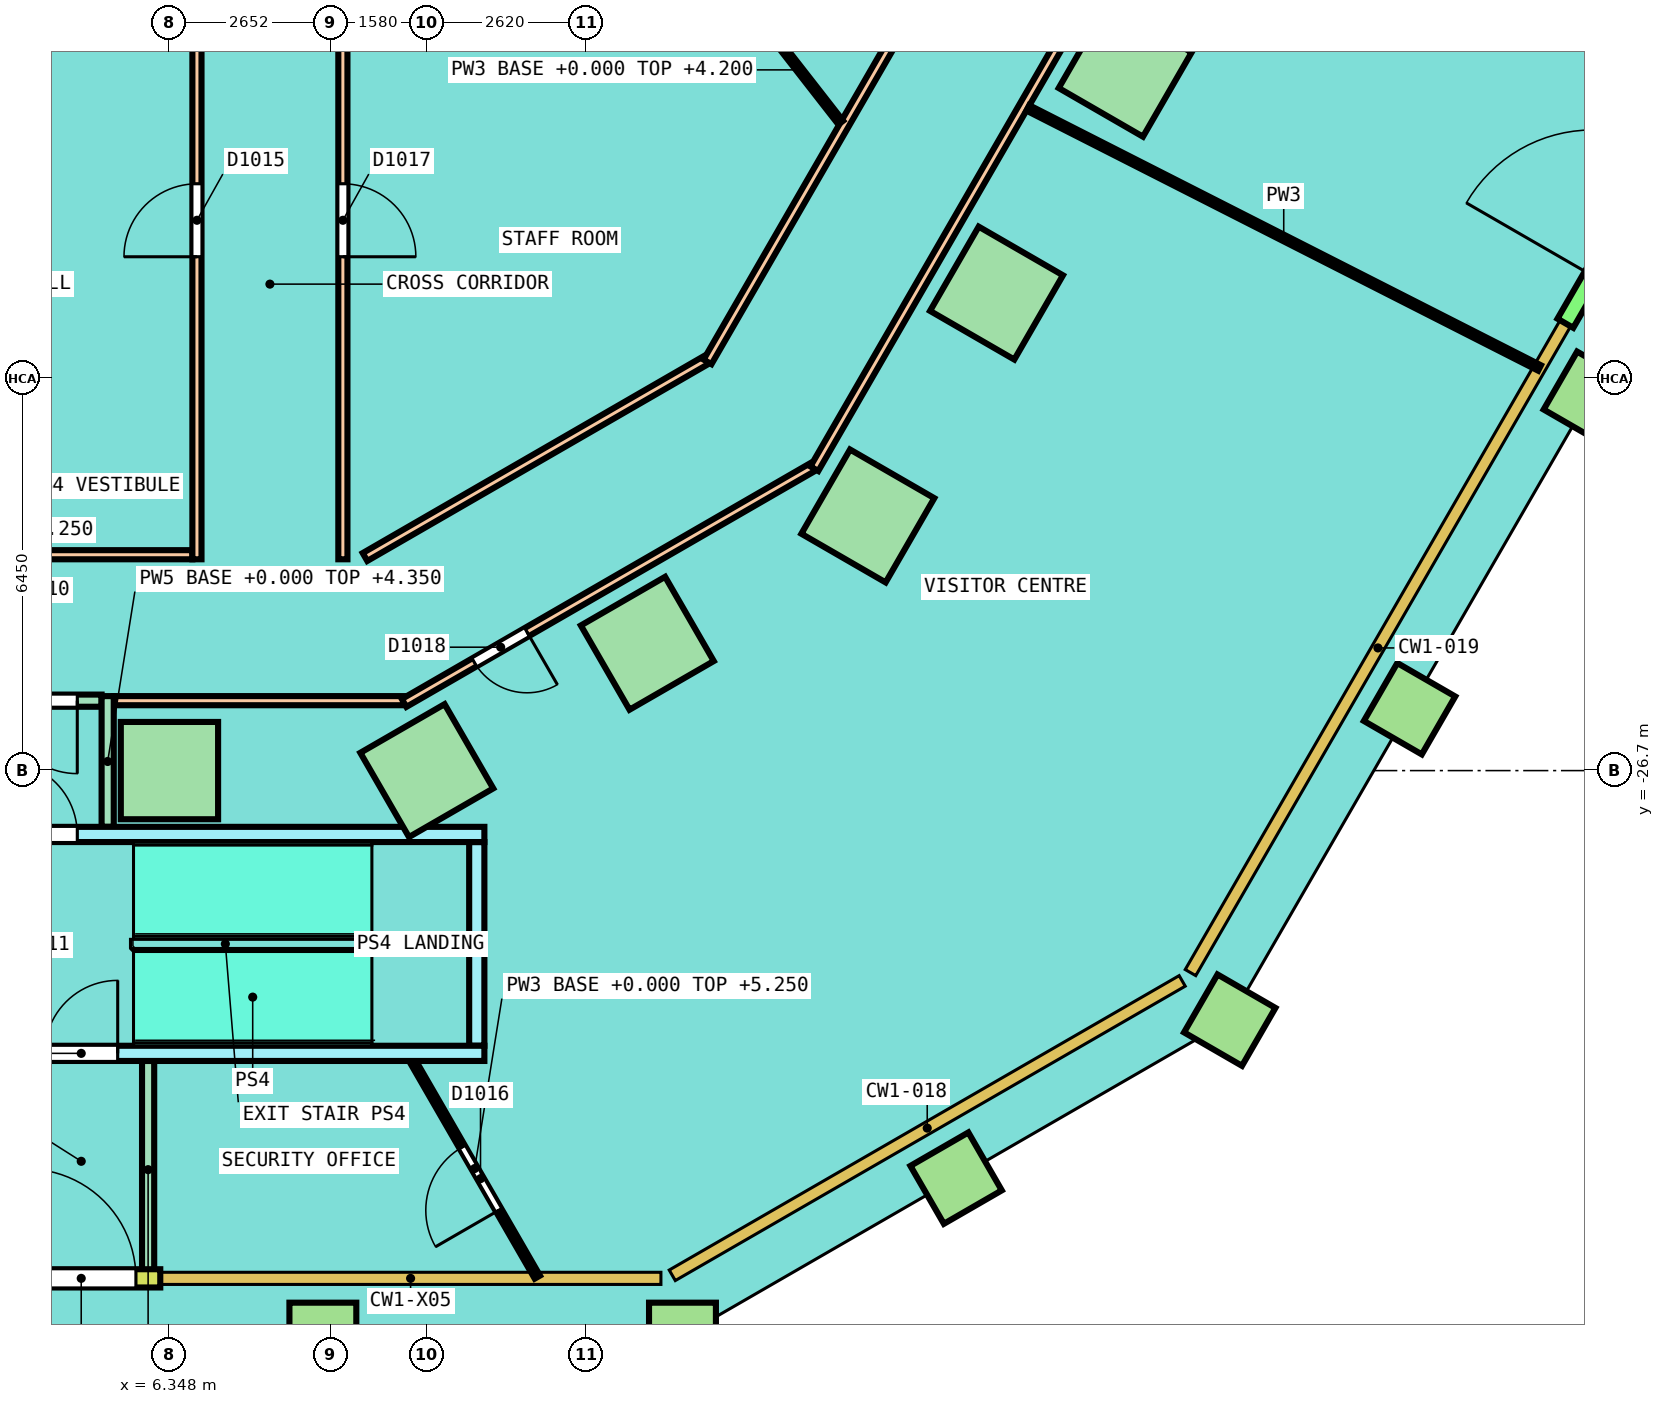
"""IFC4 building model, lengths in metres.
Left out: names, types, materials, properties, quantities, classifications, styles, units other than length and angle.
Written with IfcOpenShell. Run it as: python <this file> out.ifc"""

import sys

from ifc_helpers import new_model, si_unit, direction, frame, frame_2d, origin, origin_2d, place, context, subcontext, project, spatial, rectangle, extrude, element, fill, save


model = new_model("IFC4")
c1 = context("Model", 3, precision=1e-05, world=origin(), true_north=direction((0.0, 1.0)))
c2 = subcontext(c1, "Body", "Model", "MODEL_VIEW")
j1 = project(units=[si_unit("LENGTHUNIT", "METRE"), si_unit("PLANEANGLEUNIT", "RADIAN")], contexts=[c1])
p1 = place(None, origin())
s1 = spatial("IfcSite", under=j1, at=p1, CompositionType="ELEMENT")
p2 = place(p1, origin())
s2 = spatial("IfcBuilding", under=s1, at=p2, CompositionType="ELEMENT")
p3 = place(p2, origin())
s3 = spatial("IfcBuildingStorey", under=s2, at=p3, CompositionType="ELEMENT", Elevation=0.0)
for number, where, z_axis, x_axis in (
    (1, (6.348, -26.7, 0.0), (0.0, 0.0, 1.0), (1.0, 0.0, 0.0)),
    (2, (10.58, -26.7, 0.0), (0.0, 0.0, 1.0), (0.866, 0.5, 0.0)),
    (3, (14.206, -24.606, 0.0), (0.0, 0.0, 1.0), (0.866, 0.5, 0.0)),
    (4, (17.833, -22.512, 0.0), (0.0, 0.0, 1.0), (0.5, 0.866, 0.0)),
    (5, (19.949, -18.847, 0.0), (0.0, 0.0, 1.0), (0.5, 0.866, 0.0)),
    (6, (22.065, -15.183, 0.0), (0.0, 0.0, 1.0), (0.5, 0.866, 0.0)),
):
    element("IfcColumn", number, at=place(p3, frame(where, z_axis=z_axis, x_axis=x_axis)), inside=s3, PredefinedType="COLUMN", context=c2, shape_type="SweptSolid", body=[
        extrude(rectangle(XDim=1.6, YDim=1.6, at=origin_2d()), origin(), (0.0, 0.0, 1.0), 5.25),
    ])
for number, where, z_axis, x_axis in (
    (7, (8.871, -36.0, -0.35), (0.0, 0.0, 1.0), (1.0, 0.0, 0.0)),
    (8, (14.785, -36.0, -0.35), (0.0, 0.0, 1.0), (1.0, 0.0, 0.0)),
    (9, (19.285, -33.402, -0.35), (0.0, 0.0, 1.0), (0.866, 0.5, 0.0)),
    (10, (23.785, -30.804, -0.35), (0.0, 0.0, 1.0), (0.5, 0.866, 0.0)),
    (11, (26.741, -25.682, -0.35), (0.0, 0.0, 1.0), (0.5, 0.866, 0.0)),
    (12, (29.698, -20.561, -0.35), (0.0, 0.0, 1.0), (0.5, 0.866, 0.0)),
):
    element("IfcColumn", number, at=place(p3, frame(where, z_axis=z_axis, x_axis=x_axis)), inside=s3, PredefinedType="COLUMN", context=c2, shape_type="SweptSolid", body=[
        extrude(rectangle(XDim=1.1, YDim=1.1, at=origin_2d()), origin(), (0.0, 0.0, 1.0), 5.6),
    ])
p4 = place(p3, frame((29.304, -19.344, 0.0), z_axis=(0.0, 0.0, 1.0), x_axis=(0.500002543286, 0.866023935413, 0.0)))
e13 = element("IfcWall", 13, at=p4, inside=s3, PredefinedType="SOLIDWALL", context=c2, shape_type="SweptSolid", body=[
    extrude(rectangle(XDim=4.2, YDim=0.3, at=frame_2d((2.1, 0.0))), origin(), (0.0, 0.0, 1.0), 5.25),
])
p5 = place(p4, frame((0.9, 0.0, 0.0)))
e14 = element("IfcOpeningElement", 14, at=p5, cuts=e13, PredefinedType="OPENING", context=c2, shape_type="SweptSolid", body=[
    extrude(rectangle(XDim=2.4, YDim=3.0, at=frame_2d((1.2, 1.5))), frame((0.0, 0.16, 0.0), z_axis=(0.0, -1.0, 0.0), x_axis=(1.0, 0.0, 0.0)), (0.0, 0.0, 1.0), 0.32),
])
p6 = place(p3, frame((3.597, -35.05, 0.0), z_axis=(0.0, 0.0, 1.0), x_axis=(1.0, 0.0, 0.0)))
e15 = element("IfcWall", 15, at=p6, inside=s3, PredefinedType="SOLIDWALL", context=c2, shape_type="SweptSolid", body=[
    extrude(rectangle(XDim=2.6, YDim=0.3, at=frame_2d((1.3, 0.0))), origin(), (0.0, 0.0, 1.0), 5.25),
])
p7 = place(p6, frame((2.2, 0.0, 0.0), z_axis=(0.0, 0.0, 1.0), x_axis=(-1.0, 0.0, 0.0)))
e16 = element("IfcOpeningElement", 16, at=p7, cuts=e15, PredefinedType="OPENING", context=c2, shape_type="SweptSolid", body=[
    extrude(rectangle(XDim=1.8, YDim=2.4, at=frame_2d((0.9, 1.2))), frame((0.0, 0.16, 0.0), z_axis=(0.0, -1.0, 0.0), x_axis=(1.0, 0.0, 0.0)), (0.0, 0.0, 1.0), 0.32),
])
p8 = place(p3, frame((-9.704, -23.15, 0.0), z_axis=(0.0, 0.0, 1.0), x_axis=(1.0, 0.0, 0.0)))
e17 = element("IfcWall", 17, at=p8, inside=s3, PredefinedType="PARTITIONING", context=c2, shape_type="SweptSolid", body=[
    extrude(rectangle(XDim=16.429, YDim=0.15, at=frame_2d((8.214, 0.0))), origin(), (0.0, 0.0, 1.0), 4.2),
])
p9 = place(p3, frame((5.432, -25.55, 0.0), z_axis=(0.0, 0.0, 1.0), x_axis=(1.0, 0.0, 0.0)))
e18 = element("IfcWall", 18, at=p9, inside=s3, PredefinedType="PARTITIONING", context=c2, shape_type="SweptSolid", body=[
    extrude(rectangle(XDim=4.765, YDim=0.15, at=frame_2d((2.382, 0.0))), origin(), (0.0, 0.0, 1.0), 4.2),
])
p10 = place(p3, frame((9.564, -23.188, 0.0), z_axis=(0.0, 0.0, 1.0), x_axis=(0.866024786089, 0.500001069878, 0.0)))
e19 = element("IfcWall", 19, at=p10, inside=s3, PredefinedType="PARTITIONING", context=c2, shape_type="SweptSolid", body=[
    extrude(rectangle(XDim=6.473, YDim=0.15, at=frame_2d((3.236, 0.0))), origin(), (0.0, 0.0, 1.0), 4.2),
])
p11 = place(p3, frame((15.197, -19.979, 0.0), z_axis=(0.0, 0.0, 1.0), x_axis=(0.499992422807, 0.866029778435, 0.0)))
e20 = element("IfcWall", 20, at=p11, inside=s3, PredefinedType="PARTITIONING", context=c2, shape_type="SweptSolid", body=[
    extrude(rectangle(XDim=19.257, YDim=0.15, at=frame_2d((9.628, 0.0))), origin(), (0.0, 0.0, 1.0), 4.2),
])
p12 = place(p11, frame((9.43, 0.0, 0.0)))
e21 = element("IfcOpeningElement", 21, at=p12, cuts=e20, PredefinedType="OPENING", context=c2, shape_type="SweptSolid", body=[
    extrude(rectangle(XDim=1.0, YDim=2.1, at=frame_2d((0.5, 1.05))), frame((0.0, 0.085, 0.0), z_axis=(0.0, -1.0, 0.0), x_axis=(1.0, 0.0, 0.0)), (0.0, 0.0, 1.0), 0.17),
])
p13 = place(p3, frame((10.207, -25.587, 0.0), z_axis=(0.0, 0.0, 1.0), x_axis=(0.866023143435, 0.50000391502, 0.0)))
e22 = element("IfcWall", 22, at=p13, inside=s3, PredefinedType="PARTITIONING", context=c2, shape_type="SweptSolid", body=[
    extrude(rectangle(XDim=7.759, YDim=0.15, at=frame_2d((3.879, 0.0))), origin(), (0.0, 0.0, 1.0), 4.2),
])
p14 = place(p13, frame((1.334, 0.0, 0.0)))
e23 = element("IfcOpeningElement", 23, at=p14, cuts=e22, PredefinedType="OPENING", context=c2, shape_type="SweptSolid", body=[
    extrude(rectangle(XDim=1.0, YDim=2.1, at=frame_2d((0.5, 1.05))), frame((0.0, 0.085, 0.0), z_axis=(0.0, -1.0, 0.0), x_axis=(1.0, 0.0, 0.0)), (0.0, 0.0, 1.0), 0.17),
])
p15 = place(p3, frame((16.954, -21.736, 0.0), z_axis=(0.0, 0.0, 1.0), x_axis=(0.499996491498, 0.86602742941, 0.0)))
e24 = element("IfcWall", 24, at=p15, inside=s3, PredefinedType="PARTITIONING", context=c2, shape_type="SweptSolid", body=[
    extrude(rectangle(XDim=20.694, YDim=0.15, at=frame_2d((10.347, 0.0))), origin(), (0.0, 0.0, 1.0), 4.2),
])
p16 = place(p15, frame((13.254, 0.0, 0.0)))
e25 = element("IfcOpeningElement", 25, at=p16, cuts=e24, PredefinedType="OPENING", context=c2, shape_type="SweptSolid", body=[
    extrude(rectangle(XDim=1.0, YDim=2.1, at=frame_2d((0.5, 1.05))), frame((0.0, 0.085, 0.0), z_axis=(0.0, -1.0, 0.0), x_axis=(1.0, 0.0, 0.0)), (0.0, 0.0, 1.0), 0.17),
])
p17 = place(p3, frame((6.8, -23.225, 0.0), z_axis=(0.0, 0.0, 1.0), x_axis=(0.0, 1.0, 0.0)))
e26 = element("IfcWall", 26, at=p17, inside=s3, PredefinedType="PARTITIONING", context=c2, shape_type="SweptSolid", body=[
    extrude(rectangle(XDim=9.05, YDim=0.15, at=frame_2d((4.525, 0.0))), origin(), (0.0, 0.0, 1.0), 4.2),
])
p18 = place(p17, frame((4.975, 0.0, 0.0)))
e27 = element("IfcOpeningElement", 27, at=p18, cuts=e26, PredefinedType="OPENING", context=c2, shape_type="SweptSolid", body=[
    extrude(rectangle(XDim=1.2, YDim=2.1, at=frame_2d((0.6, 1.05))), frame((0.0, 0.085, 0.0), z_axis=(0.0, -1.0, 0.0), x_axis=(1.0, 0.0, 0.0)), (0.0, 0.0, 1.0), 0.17),
])
p19 = place(p3, frame((9.2, -23.225, 0.0), z_axis=(0.0, 0.0, 1.0), x_axis=(0.0, 1.0, 0.0)))
e28 = element("IfcWall", 28, at=p19, inside=s3, PredefinedType="PARTITIONING", context=c2, shape_type="SweptSolid", body=[
    extrude(rectangle(XDim=9.05, YDim=0.15, at=frame_2d((4.525, 0.0))), origin(), (0.0, 0.0, 1.0), 4.2),
])
p20 = place(p19, frame((4.975, 0.0, 0.0)))
e29 = element("IfcOpeningElement", 29, at=p20, cuts=e28, PredefinedType="OPENING", context=c2, shape_type="SweptSolid", body=[
    extrude(rectangle(XDim=1.2, YDim=2.1, at=frame_2d((0.6, 1.05))), frame((0.0, 0.085, 0.0), z_axis=(0.0, -1.0, 0.0), x_axis=(1.0, 0.0, 0.0)), (0.0, 0.0, 1.0), 0.17),
])
p21 = place(p3, frame((3.232, -25.55, 0.0), z_axis=(0.0, 0.0, 1.0), x_axis=(1.0, 0.0, 0.0)))
e30 = element("IfcWall", 30, at=p21, inside=s3, PredefinedType="PARTITIONING", context=c2, shape_type="SweptSolid", body=[
    extrude(rectangle(XDim=2.0, YDim=0.2, at=frame_2d((1.0, 0.0))), origin(), (0.0, 0.0, 1.0), 5.25),
])
p22 = place(p21, frame((1.6, 0.0, 0.0), z_axis=(0.0, 0.0, 1.0), x_axis=(-1.0, 0.0, 0.0)))
e31 = element("IfcOpeningElement", 31, at=p22, cuts=e30, PredefinedType="OPENING", context=c2, shape_type="SweptSolid", body=[
    extrude(rectangle(XDim=1.2, YDim=2.1, at=frame_2d((0.6, 1.05))), frame((0.0, 0.11, 0.0), z_axis=(0.0, -1.0, 0.0), x_axis=(1.0, 0.0, 0.0)), (0.0, 0.0, 1.0), 0.22),
])
p23 = place(p3, frame((5.332, -27.625, 0.0), z_axis=(0.0, 0.0, 1.0), x_axis=(0.0, 1.0, 0.0)))
e32 = element("IfcWall", 32, at=p23, inside=s3, PredefinedType="PARTITIONING", context=c2, shape_type="SweptSolid", body=[
    extrude(rectangle(XDim=2.15, YDim=0.2, at=frame_2d((1.075, 0.0))), origin(), (0.0, 0.0, 1.0), 4.35),
])
p24 = place(p3, frame((5.997, -35.05, 0.0), z_axis=(0.0, 0.0, 1.0), x_axis=(0.0, 1.0, 0.0)))
e33 = element("IfcWall", 33, at=p24, inside=s3, PredefinedType="PARTITIONING", context=c2, shape_type="SweptSolid", body=[
    extrude(rectangle(XDim=3.575, YDim=0.2, at=frame_2d((1.788, 0.0))), origin(), (0.0, 0.0, 1.0), 5.25),
])
p25 = place(p3, frame((10.336, -31.458, 0.0), z_axis=(0.0, 0.0, 1.0), x_axis=(0.50004186299, -0.866001232827, 0.0)))
e34 = element("IfcWall", 34, at=p25, inside=s3, PredefinedType="PARTITIONING", context=c2, shape_type="SweptSolid", body=[
    extrude(rectangle(XDim=4.124, YDim=0.1, at=frame_2d((2.062, 0.0))), origin(), (0.0, 0.0, 1.0), 5.25),
])
p26 = place(p25, frame((1.655, 0.0, 0.0)))
e35 = element("IfcOpeningElement", 35, at=p26, cuts=e34, PredefinedType="OPENING", context=c2, shape_type="SweptSolid", body=[
    extrude(rectangle(XDim=1.2, YDim=2.1, at=frame_2d((0.6, 1.05))), frame((0.0, 0.06, 0.0), z_axis=(0.0, -1.0, 0.0), x_axis=(1.0, 0.0, 0.0)), (0.0, 0.0, 1.0), 0.12),
])
p27 = place(p3, frame((16.035, -14.309, 0.0), z_axis=(0.0, 0.0, 1.0), x_axis=(0.614862065397, -0.788634668611, 0.0)))
e36 = element("IfcWall", 36, at=p27, inside=s3, PredefinedType="PARTITIONING", context=c2, shape_type="SweptSolid", body=[
    extrude(rectangle(XDim=2.2, YDim=0.1, at=frame_2d((1.1, 0.0))), origin(), (0.0, 0.0, 1.0), 4.2),
])
p28 = place(p3, frame((20.465, -15.803, 0.0), z_axis=(0.0, 0.0, 1.0), x_axis=(0.891490323064, -0.453039737643, 0.0)))
e37 = element("IfcWall", 37, at=p28, inside=s3, PredefinedType="PARTITIONING", context=c2, shape_type="SweptSolid", body=[
    extrude(rectangle(XDim=9.438, YDim=0.1, at=frame_2d((4.719, 0.0))), origin(), (0.0, 0.0, 1.0), 4.35),
])
p29 = place(p3, frame((11.402, -31.225, 0.0), z_axis=(0.0, 0.0, 1.0), x_axis=(0.0, 1.0, 0.0)))
e38 = element("IfcWall", 38, at=p29, inside=s3, PredefinedType="SOLIDWALL", context=c2, shape_type="SweptSolid", body=[
    extrude(rectangle(XDim=3.35, YDim=0.25, at=frame_2d((1.675, 0.0))), origin(), (0.0, 0.0, 1.0), 5.25),
])
p30 = place(p3, frame((3.032, -27.75, 0.0), z_axis=(0.0, 0.0, 1.0), x_axis=(1.0, 0.0, 0.0)))
e39 = element("IfcWall", 39, at=p30, inside=s3, PredefinedType="SOLIDWALL", context=c2, shape_type="SweptSolid", body=[
    extrude(rectangle(XDim=8.495, YDim=0.25, at=frame_2d((4.248, 0.0))), origin(), (0.0, 0.0, 1.0), 5.25),
])
p31 = place(p30, frame((1.8, 0.0, 0.0), z_axis=(0.0, 0.0, 1.0), x_axis=(-1.0, 0.0, 0.0)))
e40 = element("IfcOpeningElement", 40, at=p31, cuts=e39, PredefinedType="OPENING", context=c2, shape_type="SweptSolid", body=[
    extrude(rectangle(XDim=1.2, YDim=2.1, at=frame_2d((0.6, 1.05))), frame((0.0, 0.135, 0.0), z_axis=(0.0, -1.0, 0.0), x_axis=(1.0, 0.0, 0.0)), (0.0, 0.0, 1.0), 0.27),
])
p32 = place(p3, frame((3.022, -31.35, 0.0), z_axis=(0.0, 0.0, 1.0), x_axis=(1.0, 0.0, 0.0)))
e41 = element("IfcWall", 41, at=p32, inside=s3, PredefinedType="SOLIDWALL", context=c2, shape_type="SweptSolid", body=[
    extrude(rectangle(XDim=8.505, YDim=0.25, at=frame_2d((4.252, 0.0))), origin(), (0.0, 0.0, 1.0), 5.25),
])
p33 = place(p32, frame((2.475, 0.0, 0.0), z_axis=(0.0, 0.0, 1.0), x_axis=(-1.0, 0.0, 0.0)))
e42 = element("IfcOpeningElement", 42, at=p33, cuts=e41, PredefinedType="OPENING", context=c2, shape_type="SweptSolid", body=[
    extrude(rectangle(XDim=1.2, YDim=2.1, at=frame_2d((0.6, 1.05))), frame((0.0, 0.135, 0.0), z_axis=(0.0, -1.0, 0.0), x_axis=(1.0, 0.0, 0.0)), (0.0, 0.0, 1.0), 0.27),
])
p34 = place(p3, frame((24.277, -29.951, -0.25), z_axis=(0.0, 0.0, 1.0), x_axis=(0.866031096941, -0.499990139034, 0.0)))
e43 = element("IfcWall", 43, at=p34, inside=s3, PredefinedType="SOLIDWALL", context=c2, shape_type="SweptSolid", body=[
    extrude(rectangle(XDim=3.0, YDim=0.4, at=frame_2d((1.5, 0.0))), origin(), (0.0, 0.0, 1.0), 5.85),
])
for number, where, z_axis, x_axis in (
    (44, (24.55, -29.878, -0.25), (0.0, 0.0, 1.0), (0.5, 0.866, 0.0)),
    (45, (26.802, -31.178, -0.25), (0.0, 0.0, 1.0), (0.5, 0.866, 0.0)),
):
    element("IfcWall", number, at=place(p3, frame(where, z_axis=z_axis, x_axis=x_axis)), inside=s3, PredefinedType="SOLIDWALL", context=c2, shape_type="SweptSolid", body=[
        extrude(rectangle(XDim=13.2, YDim=0.4, at=frame_2d((6.6, 0.0))), origin(), (0.0, 0.0, 1.0), 5.85),
    ])
p35 = place(p3, frame((24.077, -30.298, -0.25), z_axis=(0.0, 0.0, 1.0), x_axis=(0.866031096941, -0.499990139034, 0.0)))
e46 = element("IfcWall", 46, at=p35, inside=s3, PredefinedType="SOLIDWALL", context=c2, shape_type="SweptSolid", body=[
    extrude(rectangle(XDim=3.0, YDim=0.4, at=frame_2d((1.5, 0.0))), origin(), (0.0, 0.0, 1.0), 5.85),
])
for number, where, z_axis, x_axis in (
    (47, (26.675, -31.798, -0.25), (0.0, 0.0, 1.0), (0.866, -0.5, 0.0)),
    (48, (28.364, -32.773, -0.25), (0.0, 0.0, 1.0), (0.866, -0.5, 0.0)),
):
    element("IfcWall", number, at=place(p3, frame(where, z_axis=z_axis, x_axis=x_axis)), inside=s3, PredefinedType="SOLIDWALL", context=c2, shape_type="SweptSolid", body=[
        extrude(rectangle(XDim=1.95, YDim=0.4, at=frame_2d((0.975, 0.0))), origin(), (0.0, 0.0, 1.0), 5.85),
    ])
p36 = place(p7, origin())
e49 = element("IfcDoor", 49, at=p36, inside=s3, OperationType="DOUBLE_DOOR_SINGLE_SWING", PredefinedType="DOOR", context=c2, shape_type="SweptSolid", body=[
    extrude(rectangle(XDim=1.8, YDim=2.4, at=frame_2d((0.9, 1.2))), frame((0.0, 0.025, 0.0), z_axis=(0.0, -1.0, 0.0), x_axis=(1.0, 0.0, 0.0)), (0.0, 0.0, 1.0), 0.05),
])
fill(e16, e49)
p37 = place(p18, origin())
e50 = element("IfcDoor", 50, at=p37, inside=s3, OperationType="DOUBLE_DOOR_SINGLE_SWING", PredefinedType="DOOR", context=c2, shape_type="SweptSolid", body=[
    extrude(rectangle(XDim=1.2, YDim=2.1, at=frame_2d((0.6, 1.05))), frame((0.0, 0.025, 0.0), z_axis=(0.0, -1.0, 0.0), x_axis=(1.0, 0.0, 0.0)), (0.0, 0.0, 1.0), 0.05),
])
fill(e27, e50)
p38 = place(p26, origin())
e51 = element("IfcDoor", 51, at=p38, inside=s3, OperationType="DOUBLE_DOOR_SINGLE_SWING", PredefinedType="DOOR", context=c2, shape_type="SweptSolid", body=[
    extrude(rectangle(XDim=1.2, YDim=2.1, at=frame_2d((0.6, 1.05))), frame((0.0, 0.025, 0.0), z_axis=(0.0, -1.0, 0.0), x_axis=(1.0, 0.0, 0.0)), (0.0, 0.0, 1.0), 0.05),
])
fill(e35, e51)
p39 = place(p20, origin())
e52 = element("IfcDoor", 52, at=p39, inside=s3, OperationType="DOUBLE_DOOR_SINGLE_SWING", PredefinedType="DOOR", context=c2, shape_type="SweptSolid", body=[
    extrude(rectangle(XDim=1.2, YDim=2.1, at=frame_2d((0.6, 1.05))), frame((0.0, 0.025, 0.0), z_axis=(0.0, -1.0, 0.0), x_axis=(1.0, 0.0, 0.0)), (0.0, 0.0, 1.0), 0.05),
])
fill(e29, e52)
p40 = place(p14, origin())
e53 = element("IfcDoor", 53, at=p40, inside=s3, OperationType="SINGLE_SWING_RIGHT", PredefinedType="DOOR", context=c2, shape_type="SweptSolid", body=[
    extrude(rectangle(XDim=1.0, YDim=2.1, at=frame_2d((0.5, 1.05))), frame((0.0, 0.025, 0.0), z_axis=(0.0, -1.0, 0.0), x_axis=(1.0, 0.0, 0.0)), (0.0, 0.0, 1.0), 0.05),
])
fill(e23, e53)
p41 = place(p22, origin())
e54 = element("IfcDoor", 54, at=p41, inside=s3, OperationType="SINGLE_SWING_LEFT", PredefinedType="DOOR", context=c2, shape_type="SweptSolid", body=[
    extrude(rectangle(XDim=1.2, YDim=2.1, at=frame_2d((0.6, 1.05))), frame((0.0, 0.025, 0.0), z_axis=(0.0, -1.0, 0.0), x_axis=(1.0, 0.0, 0.0)), (0.0, 0.0, 1.0), 0.05),
])
fill(e31, e54)
p42 = place(p31, origin())
e55 = element("IfcDoor", 55, at=p42, inside=s3, OperationType="SINGLE_SWING_RIGHT", PredefinedType="DOOR", context=c2, shape_type="SweptSolid", body=[
    extrude(rectangle(XDim=1.2, YDim=2.1, at=frame_2d((0.6, 1.05))), frame((0.0, 0.025, 0.0), z_axis=(0.0, -1.0, 0.0), x_axis=(1.0, 0.0, 0.0)), (0.0, 0.0, 1.0), 0.05),
])
fill(e40, e55)
p43 = place(p33, origin())
e56 = element("IfcDoor", 56, at=p43, inside=s3, OperationType="SINGLE_SWING_LEFT", PredefinedType="DOOR", context=c2, shape_type="SweptSolid", body=[
    extrude(rectangle(XDim=1.2, YDim=2.1, at=frame_2d((0.6, 1.05))), frame((0.0, 0.025, 0.0), z_axis=(0.0, -1.0, 0.0), x_axis=(1.0, 0.0, 0.0)), (0.0, 0.0, 1.0), 0.05),
])
fill(e42, e56)
save(model, sys.argv[1])
